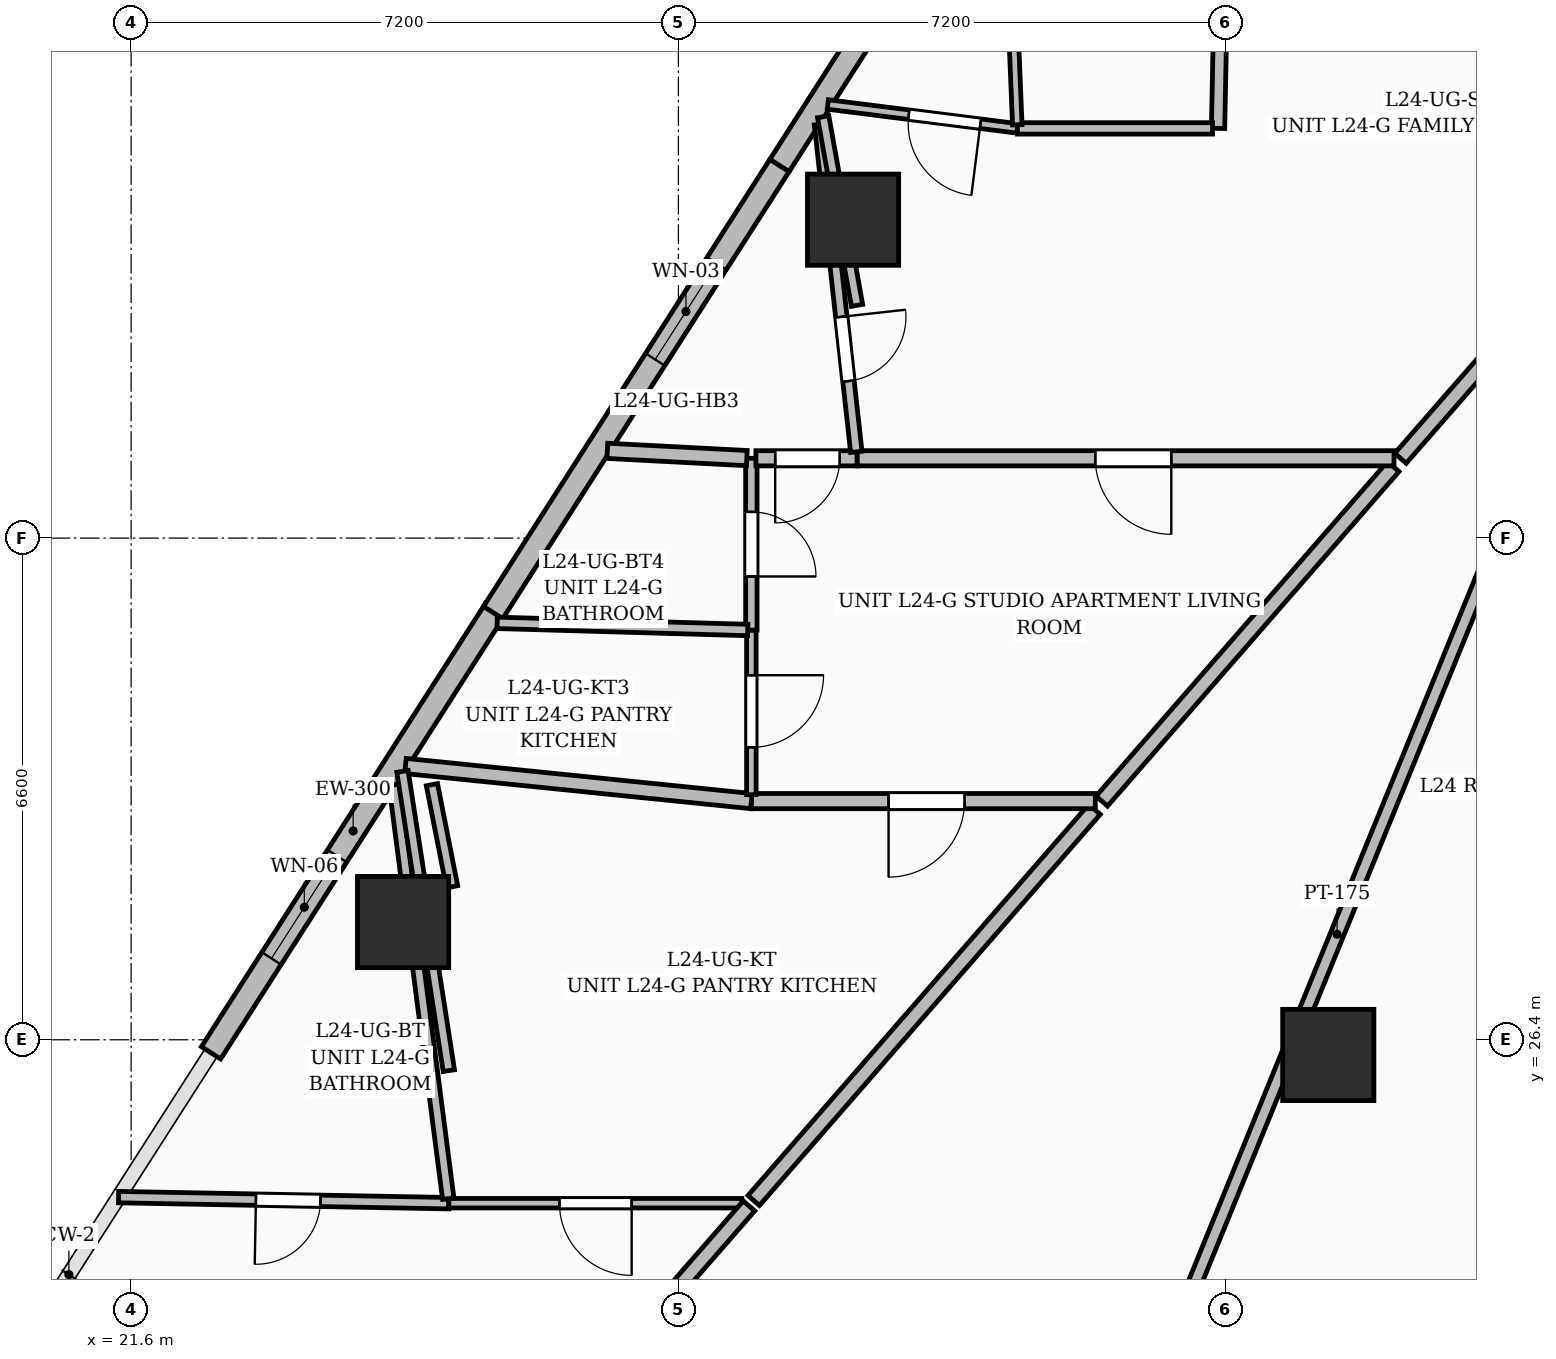
"""IFC4 building model, lengths in metres.
Left out: names, types, materials, properties, quantities, classifications, styles, units other than length and angle.
Written with IfcOpenShell. Run it as: python <this file> out.ifc"""

import sys

from ifc_helpers import new_model, si_unit, direction, frame, frame_2d, origin, origin_2d, place, context, subcontext, project, spatial, rectangle, extrude, element, fill, save


model = new_model("IFC4")
c1 = context("Model", 3, precision=1e-05, world=origin(), true_north=direction((0.0, 1.0)))
c2 = subcontext(c1, "Body", "Model", "MODEL_VIEW")
j1 = project(units=[si_unit("LENGTHUNIT", "METRE"), si_unit("PLANEANGLEUNIT", "RADIAN")], contexts=[c1])
p1 = place(None, origin())
s1 = spatial("IfcSite", under=j1, at=p1, CompositionType="ELEMENT")
p2 = place(p1, origin())
s2 = spatial("IfcBuilding", under=s1, at=p2, CompositionType="ELEMENT")
p3 = place(p2, frame((0.0, 0.0, 96.6)))
s3 = spatial("IfcBuildingStorey", under=s2, at=p3, CompositionType="ELEMENT", Elevation=96.6)
for number, where, z_axis, x_axis in (
    (1, (37.35, 26.2, 0.0), (0.0, 0.0, 1.0), (1.0, 0.0, 0.0)),
    (2, (31.098, 37.189, 0.0), (0.0, 0.0, 1.0), (1.0, 0.0, 0.0)),
    (3, (25.178, 27.949, 0.0), (0.0, 0.0, 1.0), (1.0, 0.0, 0.0)),
):
    element("IfcColumn", number, at=place(p3, frame(where, z_axis=z_axis, x_axis=x_axis)), inside=s3, PredefinedType="COLUMN", context=c2, shape_type="SweptSolid", body=[
        extrude(rectangle(XDim=1.2, YDim=1.2, at=origin_2d()), origin(), (0.0, 0.0, 1.0), 3.6),
    ])
p4 = place(p3, frame((22.651, 26.228, 0.0), z_axis=(0.0, 0.0, 1.0), x_axis=(0.539459372932, 0.842011629941, 0.0)))
e4 = element("IfcWall", 4, at=p4, inside=s3, PredefinedType="SOLIDWALL", context=c2, shape_type="SweptSolid", body=[
    extrude(rectangle(XDim=6.932, YDim=0.3, at=frame_2d((3.466, 0.0))), origin(), (0.0, 0.0, 1.0), 3.3),
])
p5 = place(p4, frame((1.475, 0.0, 0.55)))
e5 = element("IfcOpeningElement", 5, at=p5, cuts=e4, PredefinedType="OPENING", context=c2, shape_type="SweptSolid", body=[
    extrude(rectangle(XDim=1.6, YDim=2.2, at=frame_2d((0.8, 1.1))), frame((0.0, 0.16, 0.0), z_axis=(0.0, -1.0, 0.0), x_axis=(1.0, 0.0, 0.0)), (0.0, 0.0, 1.0), 0.32),
])
p6 = place(p3, frame((26.362, 32.021, 0.0), z_axis=(0.0, 0.0, 1.0), x_axis=(0.539453319381, 0.842015508295, 0.0)))
e6 = element("IfcWall", 6, at=p6, inside=s3, PredefinedType="SOLIDWALL", context=c2, shape_type="SweptSolid", body=[
    extrude(rectangle(XDim=6.985, YDim=0.3, at=frame_2d((3.493, 0.0))), origin(), (0.0, 0.0, 1.0), 3.3),
])
p7 = place(p6, frame((3.953, 0.0, 0.6)))
e7 = element("IfcOpeningElement", 7, at=p7, cuts=e6, PredefinedType="OPENING", context=c2, shape_type="SweptSolid", body=[
    extrude(rectangle(XDim=1.5, YDim=2.1, at=frame_2d((0.75, 1.05))), frame((0.0, 0.16, 0.0), z_axis=(0.0, -1.0, 0.0), x_axis=(1.0, 0.0, 0.0)), (0.0, 0.0, 1.0), 0.32),
])
p8 = place(p3, frame((30.131, 37.903, 0.0), z_axis=(0.0, 0.0, 1.0), x_axis=(0.539468344174, 0.842005882185, 0.0)))
e8 = element("IfcWall", 8, at=p8, inside=s3, PredefinedType="SOLIDWALL", context=c2, shape_type="SweptSolid", body=[
    extrude(rectangle(XDim=6.933, YDim=0.3, at=frame_2d((3.466, 0.0))), origin(), (0.0, 0.0, 1.0), 3.3),
])
p9 = place(p8, frame((2.3, 0.0, 0.8)))
e9 = element("IfcOpeningElement", 9, at=p9, cuts=e8, PredefinedType="OPENING", context=c2, shape_type="SweptSolid", body=[
    extrude(rectangle(XDim=1.2, YDim=1.8, at=frame_2d((0.6, 0.9))), frame((0.0, 0.16, 0.0), z_axis=(0.0, -1.0, 0.0), x_axis=(1.0, 0.0, 0.0)), (0.0, 0.0, 1.0), 0.32),
])
p10 = place(p3, frame((25.78, 24.25, 0.0), z_axis=(0.0, 0.0, 1.0), x_axis=(-0.999830209467, 0.018426943232, 0.0)))
e10 = element("IfcWall", 10, at=p10, inside=s3, PredefinedType="PARTITIONING", context=c2, shape_type="SweptSolid", body=[
    extrude(rectangle(XDim=4.346, YDim=0.15, at=frame_2d((2.173, 0.0))), origin(), (0.0, 0.0, 1.0), 2.32),
])
p11 = place(p10, frame((1.688, 0.0, 0.0)))
e11 = element("IfcOpeningElement", 11, at=p11, cuts=e10, PredefinedType="OPENING", context=c2, shape_type="SweptSolid", body=[
    extrude(rectangle(XDim=0.85, YDim=2.1, at=frame_2d((0.425, 1.05))), frame((0.0, 0.085, 0.0), z_axis=(0.0, -1.0, 0.0), x_axis=(1.0, 0.0, 0.0)), (0.0, 0.0, 1.0), 0.17),
])
p12 = place(p3, frame((29.635, 24.25, 0.0), z_axis=(0.0, 0.0, 1.0), x_axis=(-1.0, 0.0, 0.0)))
e12 = element("IfcWall", 12, at=p12, inside=s3, PredefinedType="PARTITIONING", context=c2, shape_type="SweptSolid", body=[
    extrude(rectangle(XDim=3.855, YDim=0.125, at=frame_2d((1.927, 0.0))), origin(), (0.0, 0.0, 1.0), 2.295),
])
p13 = place(p12, frame((1.45, 0.0, 0.0)))
e13 = element("IfcOpeningElement", 13, at=p13, cuts=e12, PredefinedType="OPENING", context=c2, shape_type="SweptSolid", body=[
    extrude(rectangle(XDim=0.95, YDim=2.2, at=frame_2d((0.475, 1.1))), frame((0.0, 0.072, 0.0), z_axis=(0.0, -1.0, 0.0), x_axis=(1.0, 0.0, 0.0)), (0.0, 0.0, 1.0), 0.145),
])
p14 = place(p3, frame((24.146, 17.814, 0.0), z_axis=(0.0, 0.0, 1.0), x_axis=(0.657360068694, 0.75357663186, 0.0)))
e14 = element("IfcWall", 14, at=p14, inside=s3, PredefinedType="PARTITIONING", context=c2, shape_type="SweptSolid", body=[
    extrude(rectangle(XDim=8.493, YDim=0.2, at=frame_2d((4.246, 0.0))), origin(), (0.0, 0.0, 1.0), 2.295),
])
p15 = place(p3, frame((25.773, 24.31, 0.0), z_axis=(0.0, 0.0, 1.0), x_axis=(-0.128542691679, 0.991703976203, 0.0)))
e15 = element("IfcWall", 15, at=p15, inside=s3, PredefinedType="PARTITIONING", context=c2, shape_type="SweptSolid", body=[
    extrude(rectangle(XDim=5.491, YDim=0.15, at=frame_2d((2.746, 0.0))), origin(), (0.0, 0.0, 1.0), 2.295),
])
p16 = place(p3, frame((29.791, 24.286, 0.0), z_axis=(0.0, 0.0, 1.0), x_axis=(0.656986124128, 0.753902667924, 0.0)))
e16 = element("IfcWall", 16, at=p16, inside=s3, PredefinedType="PARTITIONING", context=c2, shape_type="SweptSolid", body=[
    extrude(rectangle(XDim=6.824, YDim=0.2, at=frame_2d((3.412, 0.0))), origin(), (0.0, 0.0, 1.0), 2.81),
])
p17 = place(p3, frame((34.285, 29.54, 0.0), z_axis=(0.0, 0.0, 1.0), x_axis=(-1.0, 0.0, 0.0)))
e17 = element("IfcWall", 17, at=p17, inside=s3, PredefinedType="PARTITIONING", context=c2, shape_type="SweptSolid", body=[
    extrude(rectangle(XDim=4.525, YDim=0.2, at=frame_2d((2.262, 0.0))), origin(), (0.0, 0.0, 1.0), 2.81),
])
p18 = place(p17, frame((1.72, 0.0, 0.0)))
e18 = element("IfcOpeningElement", 18, at=p18, cuts=e17, PredefinedType="OPENING", context=c2, shape_type="SweptSolid", body=[
    extrude(rectangle(XDim=1.0, YDim=2.2, at=frame_2d((0.5, 1.1))), frame((0.0, 0.11, 0.0), z_axis=(0.0, -1.0, 0.0), x_axis=(1.0, 0.0, 0.0)), (0.0, 0.0, 1.0), 0.22),
])
p19 = place(p3, frame((29.76, 29.54, 0.0), z_axis=(0.0, 0.0, 1.0), x_axis=(-0.994888667237, 0.100977917408, 0.0)))
e19 = element("IfcWall", 19, at=p19, inside=s3, PredefinedType="PARTITIONING", context=c2, shape_type="SweptSolid", body=[
    extrude(rectangle(XDim=4.574, YDim=0.2, at=frame_2d((2.287, 0.0))), origin(), (0.0, 0.0, 1.0), 2.32),
])
p20 = place(p3, frame((38.205, 33.941, 0.0), z_axis=(0.0, 0.0, 1.0), x_axis=(-0.656942619395, -0.753940577779, 0.0)))
e20 = element("IfcWall", 20, at=p20, inside=s3, PredefinedType="PARTITIONING", context=c2, shape_type="SweptSolid", body=[
    extrude(rectangle(XDim=5.837, YDim=0.2, at=frame_2d((2.918, 0.0))), origin(), (0.0, 0.0, 1.0), 2.295),
])
p21 = place(p3, frame((33.402, 17.829, 0.0), z_axis=(0.0, 0.0, 1.0), x_axis=(0.377767569575, 0.925900460837, 0.0)))
e21 = element("IfcWall", 21, at=p21, inside=s3, PredefinedType="PARTITIONING", context=c2, shape_type="SweptSolid", body=[
    extrude(rectangle(XDim=21.516, YDim=0.175, at=frame_2d((10.758, 0.0))), origin(), (0.0, 0.0, 1.0), 2.259),
])
p22 = place(p3, frame((41.125, 37.285, 0.0), z_axis=(0.0, 0.0, 1.0), x_axis=(-0.657650992125, -0.753322754572, 0.0)))
e22 = element("IfcWall", 22, at=p22, inside=s3, PredefinedType="PARTITIONING", context=c2, shape_type="SweptSolid", body=[
    extrude(rectangle(XDim=4.295, YDim=0.2, at=frame_2d((2.147, 0.0))), origin(), (0.0, 0.0, 1.0), 2.32),
])
p23 = place(p3, frame((45.384, 29.606, 0.0), z_axis=(0.0, 0.0, 1.0), x_axis=(-0.566667167999, -0.823946794831, 0.0)))
e23 = element("IfcWall", 23, at=p23, inside=s3, PredefinedType="PARTITIONING", context=c2, shape_type="SweptSolid", body=[
    extrude(rectangle(XDim=14.304, YDim=0.1, at=frame_2d((7.152, 0.0))), origin(), (0.0, 0.0, 1.0), 2.81),
])
p24 = place(p3, frame((29.76, 31.79, 0.0), z_axis=(0.0, 0.0, 1.0), x_axis=(0.0, -1.0, 0.0)))
e24 = element("IfcWall", 24, at=p24, inside=s3, PredefinedType="PARTITIONING", context=c2, shape_type="SweptSolid", body=[
    extrude(rectangle(XDim=2.165, YDim=0.125, at=frame_2d((1.083, 0.0))), origin(), (0.0, 0.0, 1.0), 3.3),
])
p25 = place(p24, frame((0.593, 0.0, 0.0)))
e25 = element("IfcOpeningElement", 25, at=p25, cuts=e24, PredefinedType="OPENING", context=c2, shape_type="SweptSolid", body=[
    extrude(rectangle(XDim=0.95, YDim=2.2, at=frame_2d((0.475, 1.1))), frame((0.0, 0.072, 0.0), z_axis=(0.0, -1.0, 0.0), x_axis=(1.0, 0.0, 0.0)), (0.0, 0.0, 1.0), 0.145),
])
p26 = place(p3, frame((29.76, 34.05, 0.0), z_axis=(0.0, 0.0, 1.0), x_axis=(0.0, -1.0, 0.0)))
e26 = element("IfcWall", 26, at=p26, inside=s3, PredefinedType="PARTITIONING", context=c2, shape_type="SweptSolid", body=[
    extrude(rectangle(XDim=2.26, YDim=0.15, at=frame_2d((1.13, 0.0))), origin(), (0.0, 0.0, 1.0), 3.3),
])
p27 = place(p26, frame((0.705, 0.0, 0.0)))
e27 = element("IfcOpeningElement", 27, at=p27, cuts=e26, PredefinedType="OPENING", context=c2, shape_type="SweptSolid", body=[
    extrude(rectangle(XDim=0.85, YDim=2.1, at=frame_2d((0.425, 1.05))), frame((0.0, 0.085, 0.0), z_axis=(0.0, -1.0, 0.0), x_axis=(1.0, 0.0, 0.0)), (0.0, 0.0, 1.0), 0.17),
])
p28 = place(p3, frame((38.215, 34.05, 0.0), z_axis=(0.0, 0.0, 1.0), x_axis=(-1.0, 0.0, 0.0)))
e28 = element("IfcWall", 28, at=p28, inside=s3, PredefinedType="PARTITIONING", context=c2, shape_type="SweptSolid", body=[
    extrude(rectangle(XDim=7.065, YDim=0.2, at=frame_2d((3.533, 0.0))), origin(), (0.0, 0.0, 1.0), 2.295),
])
p29 = place(p28, frame((2.93, 0.0, 0.0)))
e29 = element("IfcOpeningElement", 29, at=p29, cuts=e28, PredefinedType="OPENING", context=c2, shape_type="SweptSolid", body=[
    extrude(rectangle(XDim=1.0, YDim=2.2, at=frame_2d((0.5, 1.1))), frame((0.0, 0.11, 0.0), z_axis=(0.0, -1.0, 0.0), x_axis=(1.0, 0.0, 0.0)), (0.0, 0.0, 1.0), 0.22),
])
p30 = place(p3, frame((31.15, 34.05, 0.0), z_axis=(0.0, 0.0, 1.0), x_axis=(-1.0, 0.0, 0.0)))
e30 = element("IfcWall", 30, at=p30, inside=s3, PredefinedType="PARTITIONING", context=c2, shape_type="SweptSolid", body=[
    extrude(rectangle(XDim=1.33, YDim=0.2, at=frame_2d((0.665, 0.0))), origin(), (0.0, 0.0, 1.0), 3.3),
])
p31 = place(p30, frame((0.227, 0.0, 0.0)))
e31 = element("IfcOpeningElement", 31, at=p31, cuts=e30, PredefinedType="OPENING", context=c2, shape_type="SweptSolid", body=[
    extrude(rectangle(XDim=0.85, YDim=2.1, at=frame_2d((0.425, 1.05))), frame((0.0, 0.11, 0.0), z_axis=(0.0, -1.0, 0.0), x_axis=(1.0, 0.0, 0.0)), (0.0, 0.0, 1.0), 0.22),
])
p32 = place(p3, frame((29.712, 31.791, 0.0), z_axis=(0.0, 0.0, 1.0), x_axis=(-0.999593715249, 0.028502709256, 0.0)))
e32 = element("IfcWall", 32, at=p32, inside=s3, PredefinedType="PARTITIONING", context=c2, shape_type="SweptSolid", body=[
    extrude(rectangle(XDim=3.298, YDim=0.15, at=frame_2d((1.649, 0.0))), origin(), (0.0, 0.0, 1.0), 2.32),
])
p33 = place(p3, frame((29.7, 34.052, 0.0), z_axis=(0.0, 0.0, 1.0), x_axis=(-0.998649577824, 0.051952100177, 0.0)))
e33 = element("IfcWall", 33, at=p33, inside=s3, PredefinedType="PARTITIONING", context=c2, shape_type="SweptSolid", body=[
    extrude(rectangle(XDim=1.837, YDim=0.2, at=frame_2d((0.919, 0.0))), origin(), (0.0, 0.0, 1.0), 2.32),
])
p34 = place(p3, frame((30.663, 38.444, 0.0), z_axis=(0.0, 0.0, 1.0), x_axis=(0.110196673345, -0.993909801332, 0.0)))
e34 = element("IfcWall", 34, at=p34, inside=s3, PredefinedType="PARTITIONING", context=c2, shape_type="SweptSolid", body=[
    extrude(rectangle(XDim=4.336, YDim=0.15, at=frame_2d((2.168, 0.0))), origin(), (0.0, 0.0, 1.0), 2.32),
])
p35 = place(p34, frame((2.548, 0.0, 0.0)))
e35 = element("IfcOpeningElement", 35, at=p35, cuts=e34, PredefinedType="OPENING", context=c2, shape_type="SweptSolid", body=[
    extrude(rectangle(XDim=0.85, YDim=2.1, at=frame_2d((0.425, 1.05))), frame((0.0, 0.085, 0.0), z_axis=(0.0, -1.0, 0.0), x_axis=(1.0, 0.0, 0.0)), (0.0, 0.0, 1.0), 0.17),
])
p36 = place(p3, frame((33.26, 38.39, 0.0), z_axis=(0.0, 0.0, 1.0), x_axis=(-0.992108113315, 0.125385371932, 0.0)))
e36 = element("IfcWall", 36, at=p36, inside=s3, PredefinedType="PARTITIONING", context=c2, shape_type="SweptSolid", body=[
    extrude(rectangle(XDim=2.514, YDim=0.125, at=frame_2d((1.257, 0.0))), origin(), (0.0, 0.0, 1.0), 3.3),
])
p37 = place(p36, frame((0.49, 0.0, 0.0)))
e37 = element("IfcOpeningElement", 37, at=p37, cuts=e36, PredefinedType="OPENING", context=c2, shape_type="SweptSolid", body=[
    extrude(rectangle(XDim=0.95, YDim=2.2, at=frame_2d((0.475, 1.1))), frame((0.0, 0.072, 0.0), z_axis=(0.0, -1.0, 0.0), x_axis=(1.0, 0.0, 0.0)), (0.0, 0.0, 1.0), 0.145),
])
p38 = place(p3, frame((35.959, 41.371, 0.0), z_axis=(0.0, 0.0, 1.0), x_axis=(-0.019814305947, -0.999803677369, 0.0)))
e38 = element("IfcWall", 38, at=p38, inside=s3, PredefinedType="PARTITIONING", context=c2, shape_type="SweptSolid", body=[
    extrude(rectangle(XDim=2.982, YDim=0.175, at=frame_2d((1.491, 0.0))), origin(), (0.0, 0.0, 1.0), 3.3),
])
p39 = place(p38, frame((0.967, 0.0, 0.0)))
e39 = element("IfcOpeningElement", 39, at=p39, cuts=e38, PredefinedType="OPENING", context=c2, shape_type="SweptSolid", body=[
    extrude(rectangle(XDim=0.95, YDim=2.2, at=frame_2d((0.475, 1.1))), frame((0.0, 0.097, 0.0), z_axis=(0.0, -1.0, 0.0), x_axis=(1.0, 0.0, 0.0)), (0.0, 0.0, 1.0), 0.195),
])
p40 = place(p3, frame((35.827, 38.39, 0.0), z_axis=(0.0, 0.0, 1.0), x_axis=(-1.0, 0.0, 0.0)))
e40 = element("IfcWall", 40, at=p40, inside=s3, PredefinedType="PARTITIONING", context=c2, shape_type="SweptSolid", body=[
    extrude(rectangle(XDim=2.567, YDim=0.15, at=frame_2d((1.284, 0.0))), origin(), (0.0, 0.0, 1.0), 3.3),
])
p41 = place(p3, frame((33.259, 38.438, 0.0), z_axis=(0.0, 0.0, 1.0), x_axis=(-0.040786210749, 0.999167896308, 0.0)))
e41 = element("IfcWall", 41, at=p41, inside=s3, PredefinedType="PARTITIONING", context=c2, shape_type="SweptSolid", body=[
    extrude(rectangle(XDim=3.885, YDim=0.125, at=frame_2d((1.942, 0.0))), origin(), (0.0, 0.0, 1.0), 3.3),
])
p42 = place(p3, frame((25.78, 25.994, 0.0), z_axis=(0.0, 0.0, 1.0), x_axis=(-0.153139237814, 0.988204621443, 0.0)))
e42 = element("IfcWall", 42, at=p42, inside=s3, PredefinedType="PARTITIONING", context=c2, shape_type="SweptSolid", body=[
    extrude(rectangle(XDim=3.984, YDim=0.15, at=frame_2d((1.992, 0.0))), origin(), (0.0, 0.0, 1.0), 2.295),
])
p43 = place(p3, frame((31.15, 36.062, 0.0), z_axis=(0.0, 0.0, 1.0), x_axis=(-0.176413917308, 0.984316072093, 0.0)))
e43 = element("IfcWall", 43, at=p43, inside=s3, PredefinedType="PARTITIONING", context=c2, shape_type="SweptSolid", body=[
    extrude(rectangle(XDim=2.521, YDim=0.15, at=frame_2d((1.261, 0.0))), origin(), (0.0, 0.0, 1.0), 3.3),
])
p44 = place(p3, frame((25.823, 28.413, 0.0), z_axis=(0.0, 0.0, 1.0), x_axis=(-0.193714356302, 0.981057973905, 0.0)))
e44 = element("IfcWall", 44, at=p44, inside=s3, PredefinedType="PARTITIONING", context=c2, shape_type="SweptSolid", body=[
    extrude(rectangle(XDim=1.369, YDim=0.15, at=frame_2d((0.684, 0.0))), origin(), (0.0, 0.0, 1.0), 3.3),
])
p45 = place(p5, origin())
e45 = element("IfcWindow", 45, at=p45, inside=s3, PartitioningType="SINGLE_PANEL", PredefinedType="WINDOW", context=c2, shape_type="SweptSolid", body=[
    extrude(rectangle(XDim=1.6, YDim=2.2, at=frame_2d((0.8, 1.1))), frame((0.0, 0.03, 0.0), z_axis=(0.0, -1.0, 0.0), x_axis=(1.0, 0.0, 0.0)), (0.0, 0.0, 1.0), 0.06),
])
fill(e5, e45)
p46 = place(p7, origin())
e46 = element("IfcWindow", 46, at=p46, inside=s3, PartitioningType="SINGLE_PANEL", PredefinedType="WINDOW", context=c2, shape_type="SweptSolid", body=[
    extrude(rectangle(XDim=1.5, YDim=2.1, at=frame_2d((0.75, 1.05))), frame((0.0, 0.03, 0.0), z_axis=(0.0, -1.0, 0.0), x_axis=(1.0, 0.0, 0.0)), (0.0, 0.0, 1.0), 0.06),
])
fill(e7, e46)
p47 = place(p13, origin())
e47 = element("IfcDoor", 47, at=p47, inside=s3, OperationType="SINGLE_SWING_LEFT", PredefinedType="DOOR", context=c2, shape_type="SweptSolid", body=[
    extrude(rectangle(XDim=0.95, YDim=2.2, at=frame_2d((0.475, 1.1))), frame((0.0, 0.025, 0.0), z_axis=(0.0, -1.0, 0.0), x_axis=(1.0, 0.0, 0.0)), (0.0, 0.0, 1.0), 0.05),
])
fill(e13, e47)
p48 = place(p11, origin())
e48 = element("IfcDoor", 48, at=p48, inside=s3, OperationType="SINGLE_SWING_RIGHT", PredefinedType="DOOR", context=c2, shape_type="SweptSolid", body=[
    extrude(rectangle(XDim=0.85, YDim=2.1, at=frame_2d((0.425, 1.05))), frame((0.0, 0.025, 0.0), z_axis=(0.0, -1.0, 0.0), x_axis=(1.0, 0.0, 0.0)), (0.0, 0.0, 1.0), 0.05),
])
fill(e11, e48)
p49 = place(p25, origin())
e49 = element("IfcDoor", 49, at=p49, inside=s3, OperationType="SINGLE_SWING_LEFT", PredefinedType="DOOR", context=c2, shape_type="SweptSolid", body=[
    extrude(rectangle(XDim=0.95, YDim=2.2, at=frame_2d((0.475, 1.1))), frame((0.0, 0.025, 0.0), z_axis=(0.0, -1.0, 0.0), x_axis=(1.0, 0.0, 0.0)), (0.0, 0.0, 1.0), 0.05),
])
fill(e25, e49)
p50 = place(p27, origin())
e50 = element("IfcDoor", 50, at=p50, inside=s3, OperationType="SINGLE_SWING_RIGHT", PredefinedType="DOOR", context=c2, shape_type="SweptSolid", body=[
    extrude(rectangle(XDim=0.85, YDim=2.1, at=frame_2d((0.425, 1.05))), frame((0.0, 0.025, 0.0), z_axis=(0.0, -1.0, 0.0), x_axis=(1.0, 0.0, 0.0)), (0.0, 0.0, 1.0), 0.05),
])
fill(e27, e50)
p51 = place(p37, origin())
e51 = element("IfcDoor", 51, at=p51, inside=s3, OperationType="SINGLE_SWING_LEFT", PredefinedType="DOOR", context=c2, shape_type="SweptSolid", body=[
    extrude(rectangle(XDim=0.95, YDim=2.2, at=frame_2d((0.475, 1.1))), frame((0.0, 0.025, 0.0), z_axis=(0.0, -1.0, 0.0), x_axis=(1.0, 0.0, 0.0)), (0.0, 0.0, 1.0), 0.05),
])
fill(e37, e51)
p52 = place(p35, origin())
e52 = element("IfcDoor", 52, at=p52, inside=s3, OperationType="SINGLE_SWING_LEFT", PredefinedType="DOOR", context=c2, shape_type="SweptSolid", body=[
    extrude(rectangle(XDim=0.85, YDim=2.1, at=frame_2d((0.425, 1.05))), frame((0.0, 0.025, 0.0), z_axis=(0.0, -1.0, 0.0), x_axis=(1.0, 0.0, 0.0)), (0.0, 0.0, 1.0), 0.05),
])
fill(e35, e52)
p53 = place(p18, origin())
e53 = element("IfcDoor", 53, at=p53, inside=s3, OperationType="SINGLE_SWING_RIGHT", PredefinedType="DOOR", context=c2, shape_type="SweptSolid", body=[
    extrude(rectangle(XDim=1.0, YDim=2.2, at=frame_2d((0.5, 1.1))), frame((0.0, 0.025, 0.0), z_axis=(0.0, -1.0, 0.0), x_axis=(1.0, 0.0, 0.0)), (0.0, 0.0, 1.0), 0.05),
])
fill(e18, e53)
p54 = place(p29, origin())
e54 = element("IfcDoor", 54, at=p54, inside=s3, OperationType="SINGLE_SWING_LEFT", PredefinedType="DOOR", context=c2, shape_type="SweptSolid", body=[
    extrude(rectangle(XDim=1.0, YDim=2.2, at=frame_2d((0.5, 1.1))), frame((0.0, 0.025, 0.0), z_axis=(0.0, -1.0, 0.0), x_axis=(1.0, 0.0, 0.0)), (0.0, 0.0, 1.0), 0.05),
])
fill(e29, e54)
p55 = place(p31, origin())
e55 = element("IfcDoor", 55, at=p55, inside=s3, OperationType="SINGLE_SWING_RIGHT", PredefinedType="DOOR", context=c2, shape_type="SweptSolid", body=[
    extrude(rectangle(XDim=0.85, YDim=2.1, at=frame_2d((0.425, 1.05))), frame((0.0, 0.025, 0.0), z_axis=(0.0, -1.0, 0.0), x_axis=(1.0, 0.0, 0.0)), (0.0, 0.0, 1.0), 0.05),
])
fill(e31, e55)
save(model, sys.argv[1])
